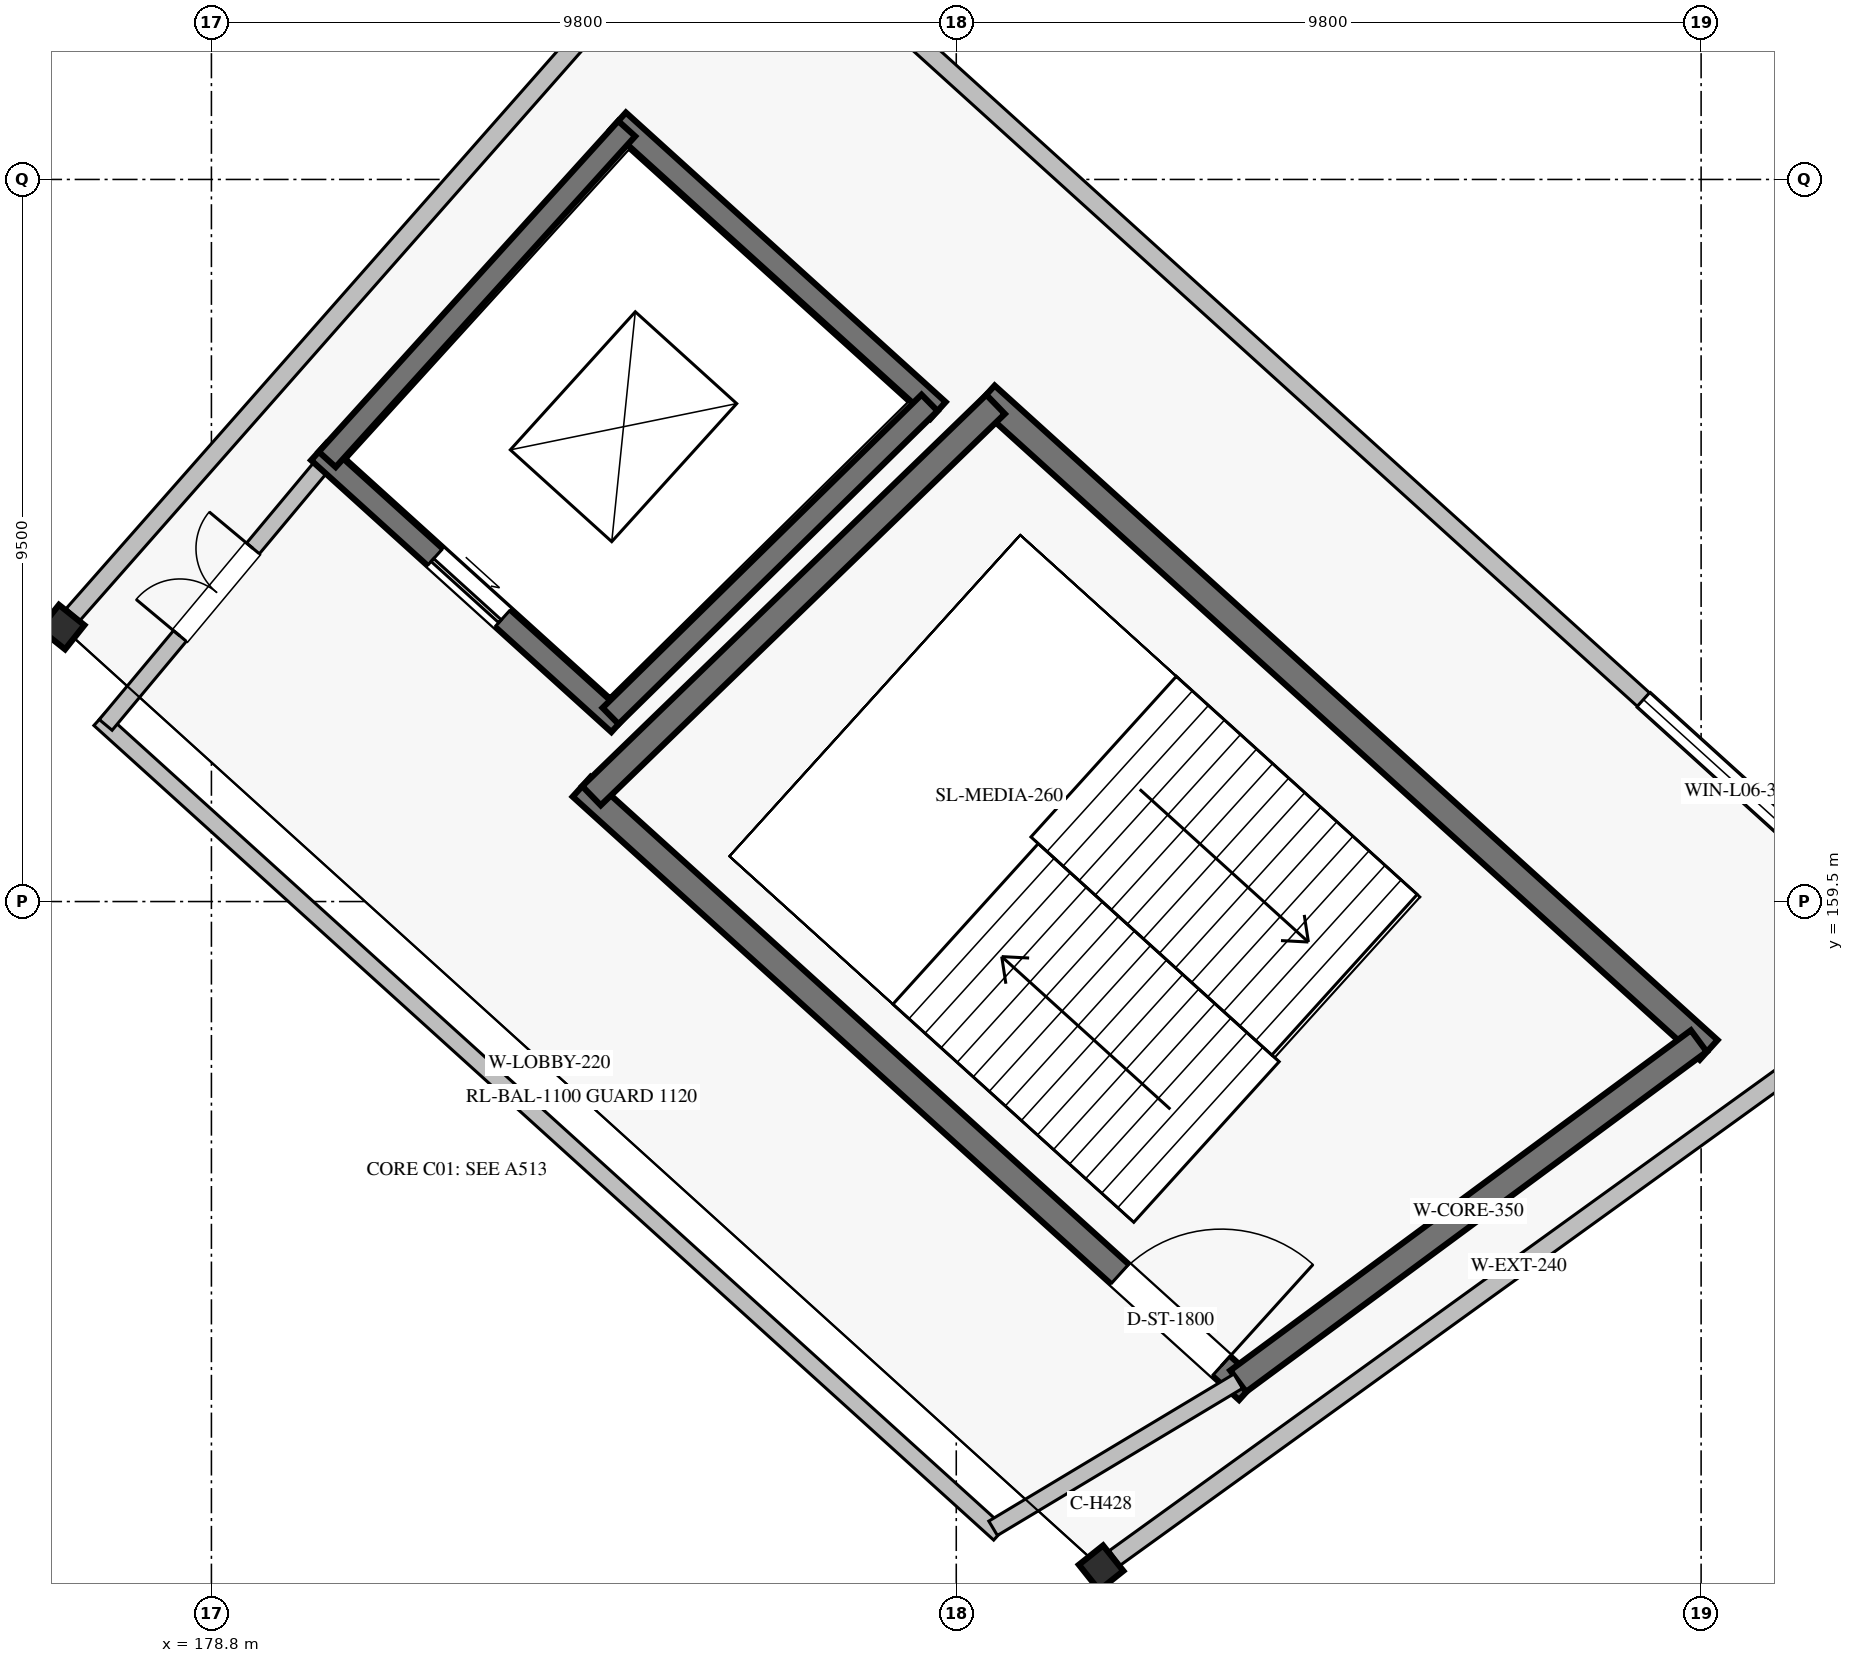
"""IFC4 building model, lengths in metres.
Left out: names, types, materials, properties, quantities, classifications, styles, units other than length and angle.
Written with IfcOpenShell. Run it as: python <this file> out.ifc"""

import sys

from ifc_helpers import new_model, si_unit, direction, frame, frame_2d, origin, origin_2d, place, context, subcontext, project, spatial, rectangle, i_section, extrude, element, fill, save


model = new_model("IFC4")
c1 = context("Model", 3, precision=1e-05, world=origin(), true_north=direction((0.0, 1.0)))
c2 = subcontext(c1, "Body", "Model", "MODEL_VIEW")
j1 = project(units=[si_unit("LENGTHUNIT", "METRE"), si_unit("PLANEANGLEUNIT", "RADIAN")], contexts=[c1])
p1 = place(None, origin())
s1 = spatial("IfcSite", under=j1, at=p1, CompositionType="ELEMENT")
p2 = place(p1, origin())
s2 = spatial("IfcBuilding", under=s1, at=p2, CompositionType="ELEMENT")
p3 = place(p2, frame((0.0, 0.0, 31.28)))
s3 = spatial("IfcBuildingStorey", under=s2, at=p3, CompositionType="ELEMENT", Elevation=31.28)
for number, where, z_axis, x_axis in (
    (1, (190.506, 150.734, 0.0), (0.0, 0.0, 1.0), (0.782, 0.623, 0.0)),
    (2, (176.834, 163.111, 0.0), (0.0, 0.0, 1.0), (0.623, 0.782, 0.0)),
):
    element("IfcColumn", number, at=place(p3, frame(where, z_axis=z_axis, x_axis=x_axis)), inside=s3, PredefinedType="COLUMN", context=c2, shape_type="SweptSolid", body=[
        extrude(i_section(OverallWidth=0.407, OverallDepth=0.428, WebThickness=0.02, FlangeThickness=0.035, FilletRadius=0.013, at=origin_2d()), origin(), (0.0, 0.0, 1.0), 5.44),
    ])
p4 = place(p3, frame((201.347, 158.802, 0.0), z_axis=(0.0, 0.0, 1.0), x_axis=(-0.74134637924, 0.671122601309, 0.0)))
e3 = element("IfcWall", 3, at=p4, inside=s3, PredefinedType="SOLIDWALL", context=c2, shape_type="SweptSolid", body=[
    extrude(rectangle(XDim=21.044, YDim=0.24, at=frame_2d((10.522, 0.0))), origin(), (0.0, 0.0, 1.0), 4.358),
])
p5 = place(p4, frame((1.4, 0.0, 1.0)))
e4 = element("IfcOpeningElement", 4, at=p5, cuts=e3, PredefinedType="OPENING", context=c2, shape_type="SweptSolid", body=[
    extrude(rectangle(XDim=3.6, YDim=2.4, at=frame_2d((1.8, 1.2))), frame((0.0, 0.13, 0.0), z_axis=(0.0, -1.0, 0.0), x_axis=(1.0, 0.0, 0.0)), (0.0, 0.0, 1.0), 0.26),
])
p6 = place(p3, frame((190.684, 150.863, 0.0), z_axis=(0.0, 0.0, 1.0), x_axis=(0.810798505274, 0.585325365797, 0.0)))
e5 = element("IfcWall", 5, at=p6, inside=s3, PredefinedType="SOLIDWALL", context=c2, shape_type="SweptSolid", body=[
    extrude(rectangle(XDim=13.114, YDim=0.24, at=frame_2d((6.557, 0.0))), origin(), (0.0, 0.0, 1.0), 4.458),
])
p7 = place(p3, frame((176.98, 163.276, 0.0), z_axis=(0.0, 0.0, 1.0), x_axis=(0.661029266372, 0.750360119542, 0.0)))
e6 = element("IfcWall", 6, at=p7, inside=s3, PredefinedType="SOLIDWALL", context=c2, shape_type="SweptSolid", body=[
    extrude(rectangle(XDim=12.818, YDim=0.24, at=frame_2d((6.409, 0.0))), origin(), (0.0, 0.0, 1.0), 4.458),
])
p8 = place(p3, frame((192.439, 153.072, 0.0), z_axis=(0.0, 0.0, 1.0), x_axis=(-0.741358227035, 0.671109513572, 0.0)))
e7 = element("IfcWall", 7, at=p8, inside=s3, PredefinedType="SHEAR", context=c2, shape_type="SweptSolid", body=[
    extrude(rectangle(XDim=11.827, YDim=0.35, at=frame_2d((5.913, 0.0))), origin(), (0.0, 0.0, 1.0), 5.16),
])
p9 = place(p8, frame((0.475, 0.0, 0.0)))
e8 = element("IfcOpeningElement", 8, at=p9, cuts=e7, PredefinedType="OPENING", context=c2, shape_type="SweptSolid", body=[
    extrude(rectangle(XDim=1.8, YDim=2.2, at=frame_2d((0.9, 1.1))), frame((0.0, 0.185, 0.0), z_axis=(0.0, -1.0, 0.0), x_axis=(1.0, 0.0, 0.0)), (0.0, 0.0, 1.0), 0.37),
])
p10 = place(p3, frame((198.499, 157.548, 0.0), z_axis=(0.0, 0.0, 1.0), x_axis=(-0.741351373721, 0.671117084183, 0.0)))
e9 = element("IfcWall", 9, at=p10, inside=s3, PredefinedType="SHEAR", context=c2, shape_type="SweptSolid", body=[
    extrude(rectangle(XDim=12.83, YDim=0.35, at=frame_2d((6.415, 0.0))), origin(), (0.0, 0.0, 1.0), 5.16),
])
p11 = place(p3, frame((192.309, 153.189, 0.0), z_axis=(0.0, 0.0, 1.0), x_axis=(0.804395625347, 0.594093997548, 0.0)))
e10 = element("IfcWall", 10, at=p11, inside=s3, PredefinedType="SHEAR", context=c2, shape_type="SweptSolid", body=[
    extrude(rectangle(XDim=7.534, YDim=0.35, at=frame_2d((3.767, 0.0))), origin(), (0.0, 0.0, 1.0), 5.16),
])
p12 = place(p3, frame((183.801, 160.892, 0.0), z_axis=(0.0, 0.0, 1.0), x_axis=(0.718297398554, 0.69573619083, 0.0)))
e11 = element("IfcWall", 11, at=p12, inside=s3, PredefinedType="SHEAR", context=c2, shape_type="SweptSolid", body=[
    extrude(rectangle(XDim=7.402, YDim=0.35, at=frame_2d((3.701, 0.0))), origin(), (0.0, 0.0, 1.0), 5.16),
])
p13 = place(p3, frame((184.163, 161.841, 0.0), z_axis=(0.0, 0.0, 1.0), x_axis=(-0.741350155641, 0.671118429736, 0.0)))
e12 = element("IfcWall", 12, at=p13, inside=s3, PredefinedType="SHEAR", context=c2, shape_type="SweptSolid", body=[
    extrude(rectangle(XDim=5.329, YDim=0.3, at=frame_2d((2.665, 0.0))), origin(), (0.0, 0.0, 1.0), 5.16),
])
p14 = place(p13, frame((2.065, 0.0, 0.0)))
e13 = element("IfcOpeningElement", 13, at=p14, cuts=e12, PredefinedType="OPENING", context=c2, shape_type="SweptSolid", body=[
    extrude(rectangle(XDim=1.2, YDim=2.2, at=frame_2d((0.6, 1.1))), frame((0.0, 0.16, 0.0), z_axis=(0.0, -1.0, 0.0), x_axis=(1.0, 0.0, 0.0)), (0.0, 0.0, 1.0), 0.32),
])
p15 = place(p3, frame((188.36, 165.961, 0.0), z_axis=(0.0, 0.0, 1.0), x_axis=(-0.74134208775, 0.671127341815, 0.0)))
e14 = element("IfcWall", 14, at=p15, inside=s3, PredefinedType="SHEAR", context=c2, shape_type="SweptSolid", body=[
    extrude(rectangle(XDim=5.675, YDim=0.3, at=frame_2d((2.837, 0.0))), origin(), (0.0, 0.0, 1.0), 5.16),
])
p16 = place(p3, frame((184.052, 161.941, 0.0), z_axis=(0.0, 0.0, 1.0), x_axis=(0.713553028001, 0.700601224828, 0.0)))
e15 = element("IfcWall", 15, at=p16, inside=s3, PredefinedType="SHEAR", context=c2, shape_type="SweptSolid", body=[
    extrude(rectangle(XDim=5.881, YDim=0.3, at=frame_2d((2.94, 0.0))), origin(), (0.0, 0.0, 1.0), 5.16),
])
p17 = place(p3, frame((180.324, 165.316, 0.0), z_axis=(0.0, 0.0, 1.0), x_axis=(0.67115829282, 0.741314067031, 0.0)))
e16 = element("IfcWall", 16, at=p17, inside=s3, PredefinedType="SHEAR", context=c2, shape_type="SweptSolid", body=[
    extrude(rectangle(XDim=5.871, YDim=0.3, at=frame_2d((2.935, 0.0))), origin(), (0.0, 0.0, 1.0), 5.16),
])
p18 = place(p3, frame((189.166, 151.181, 0.0), z_axis=(0.0, 0.0, 1.0), x_axis=(-0.741351035574, 0.671117457717, 0.0)))
e17 = element("IfcWall", 17, at=p18, inside=s3, PredefinedType="SOLIDWALL", context=c2, shape_type="SweptSolid", body=[
    extrude(rectangle(XDim=15.969, YDim=0.22, at=frame_2d((7.985, 0.0))), origin(), (0.0, 0.0, 1.0), 5.16),
])
p19 = place(p3, frame((189.085, 151.254, 0.0), z_axis=(0.0, 0.0, 1.0), x_axis=(0.857424171966, 0.514610327654, 0.0)))
e18 = element("IfcWall", 18, at=p19, inside=s3, PredefinedType="SOLIDWALL", context=c2, shape_type="SweptSolid", body=[
    extrude(rectangle(XDim=3.76, YDim=0.22, at=frame_2d((1.88, 0.0))), origin(), (0.0, 0.0, 1.0), 5.16),
])
p20 = place(p3, frame((177.409, 161.824, 0.0), z_axis=(0.0, 0.0, 1.0), x_axis=(0.640759627034, 0.767741558315, 0.0)))
e19 = element("IfcWall", 19, at=p20, inside=s3, PredefinedType="SOLIDWALL", context=c2, shape_type="SweptSolid", body=[
    extrude(rectangle(XDim=4.549, YDim=0.22, at=frame_2d((2.274, 0.0))), origin(), (0.0, 0.0, 1.0), 5.16),
])
p21 = place(p20, frame((1.524, 0.0, 0.0)))
e20 = element("IfcOpeningElement", 20, at=p21, cuts=e19, PredefinedType="OPENING", context=c2, shape_type="SweptSolid", body=[
    extrude(rectangle(XDim=1.5, YDim=2.2, at=frame_2d((0.75, 1.1))), frame((0.0, 0.12, 0.0), z_axis=(0.0, -1.0, 0.0), x_axis=(1.0, 0.0, 0.0)), (0.0, 0.0, 1.0), 0.24),
])
p22 = place(p5, origin())
e21 = element("IfcWindow", 21, at=p22, inside=s3, PartitioningType="SINGLE_PANEL", PredefinedType="WINDOW", context=c2, shape_type="SweptSolid", body=[
    extrude(rectangle(XDim=3.6, YDim=2.4, at=frame_2d((1.8, 1.2))), frame((0.0, 0.03, 0.0), z_axis=(0.0, -1.0, 0.0), x_axis=(1.0, 0.0, 0.0)), (0.0, 0.0, 1.0), 0.06),
])
fill(e4, e21)
p23 = place(p9, frame((1.8, 0.0, 0.0), z_axis=(0.0, 0.0, 1.0), x_axis=(-1.0, 0.0, 0.0)))
e22 = element("IfcDoor", 22, at=p23, inside=s3, OperationType="SINGLE_SWING_RIGHT", PredefinedType="DOOR", context=c2, shape_type="SweptSolid", body=[
    extrude(rectangle(XDim=1.8, YDim=2.2, at=frame_2d((0.9, 1.1))), frame((0.0, 0.025, 0.0), z_axis=(0.0, -1.0, 0.0), x_axis=(1.0, 0.0, 0.0)), (0.0, 0.0, 1.0), 0.05),
])
fill(e8, e22)
p24 = place(p14, origin())
e23 = element("IfcDoor", 23, at=p24, inside=s3, OperationType="SLIDING_TO_LEFT", PredefinedType="DOOR", context=c2, shape_type="SweptSolid", body=[
    extrude(rectangle(XDim=1.2, YDim=2.2, at=frame_2d((0.6, 1.1))), frame((0.0, 0.025, 0.0), z_axis=(0.0, -1.0, 0.0), x_axis=(1.0, 0.0, 0.0)), (0.0, 0.0, 1.0), 0.05),
])
fill(e13, e23)
p25 = place(p21, origin())
e24 = element("IfcDoor", 24, at=p25, inside=s3, OperationType="DOUBLE_DOOR_SINGLE_SWING", PredefinedType="DOOR", context=c2, shape_type="SweptSolid", body=[
    extrude(rectangle(XDim=1.5, YDim=2.2, at=frame_2d((0.75, 1.1))), frame((0.0, 0.025, 0.0), z_axis=(0.0, -1.0, 0.0), x_axis=(1.0, 0.0, 0.0)), (0.0, 0.0, 1.0), 0.05),
])
fill(e20, e24)
save(model, sys.argv[1])
